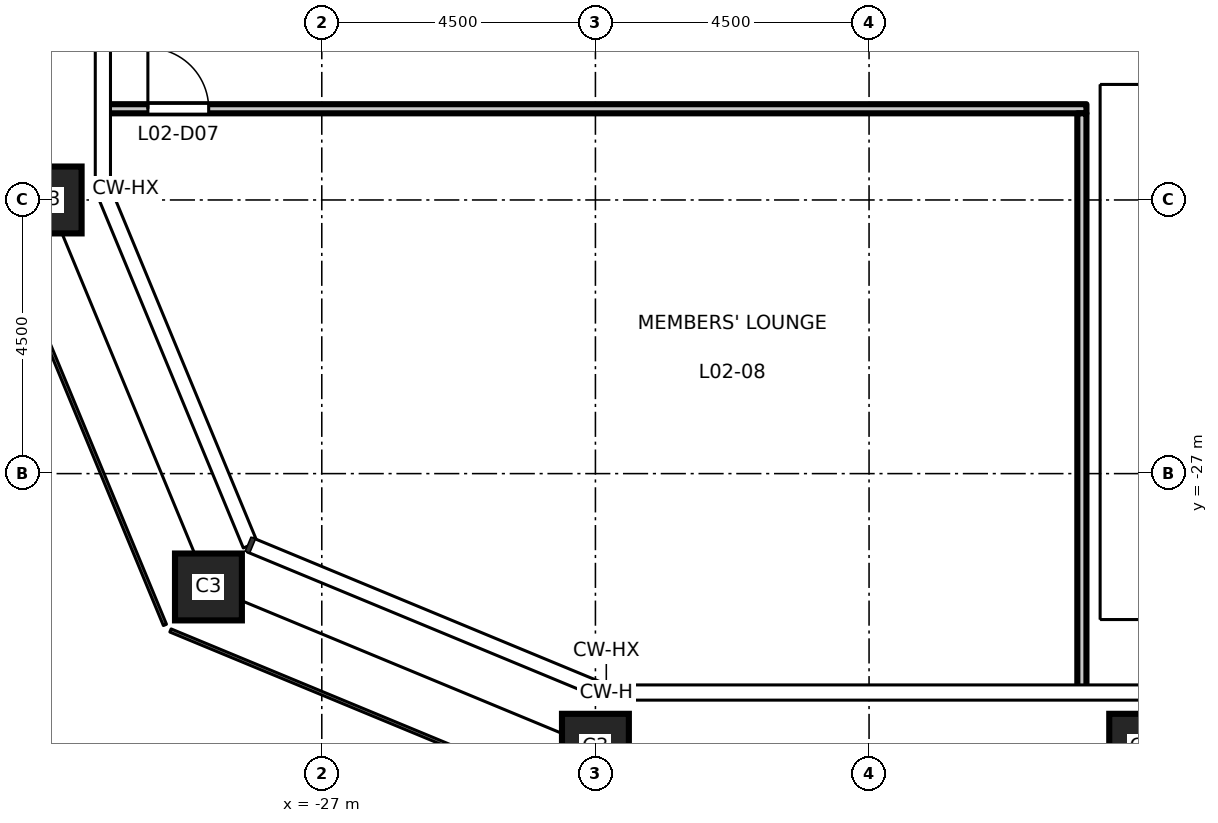
"""IFC4 building model, lengths in metres.
Left out: names, types, materials, properties, quantities, classifications, styles, units other than length and angle.
Written with IfcOpenShell. Run it as: python <this file> out.ifc"""

import sys

from ifc_helpers import new_model, si_unit, direction, frame, frame_2d, origin, origin_2d, place, context, subcontext, project, spatial, rectangle, hollow_rectangle, extrude, element, fill, save


model = new_model("IFC4")
c1 = context("Model", 3, precision=1e-05, world=origin(), true_north=direction((0.0, 1.0)))
c2 = subcontext(c1, "Body", "Model", "MODEL_VIEW")
j1 = project(units=[si_unit("LENGTHUNIT", "METRE"), si_unit("PLANEANGLEUNIT", "RADIAN")], contexts=[c1])
p1 = place(None, origin())
s1 = spatial("IfcSite", under=j1, at=p1, CompositionType="ELEMENT")
p2 = place(p1, origin())
s2 = spatial("IfcBuilding", under=s1, at=p2, CompositionType="ELEMENT")
p3 = place(p2, frame((0.0, 0.0, 12.2)))
s3 = spatial("IfcBuildingStorey", under=s2, at=p3, CompositionType="ELEMENT", Elevation=12.2)
for number, where, z_axis, x_axis in (
    (1, (-22.5, -31.5, 0.0), (0.0, 0.0, 1.0), (1.0, 0.0, 0.0)),
    (2, (-13.5, -31.5, 0.0), (0.0, 0.0, 1.0), (1.0, 0.0, 0.0)),
    (3, (-31.5, -22.5, 0.0), (0.0, 0.0, 1.0), (1.0, 0.0, 0.0)),
    (4, (-28.864, -28.864, 0.0), (0.0, 0.0, 1.0), (1.0, 0.0, 0.0)),
):
    element("IfcColumn", number, at=place(p3, frame(where, z_axis=z_axis, x_axis=x_axis)), inside=s3, PredefinedType="COLUMN", context=c2, shape_type="SweptSolid", body=[
        extrude(hollow_rectangle(XDim=1.1, YDim=1.1, WallThickness=0.07, at=origin_2d()), origin(), (0.0, 0.0, 1.0), 5.0),
    ])
p4 = place(p3, frame((-30.51, -21.0, 0.0), z_axis=(0.0, 0.0, 1.0), x_axis=(1.0, 0.0, 0.0)))
e5 = element("IfcWall", 5, at=p4, inside=s3, PredefinedType="PARTITIONING", context=c2, shape_type="SweptSolid", body=[
    extrude(rectangle(XDim=16.085, YDim=0.15, at=frame_2d((8.042, 0.0))), origin(), (0.0, 0.0, 1.0), 4.85),
])
p5 = place(p4, frame((0.65, 0.0, 0.0)))
e6 = element("IfcOpeningElement", 6, at=p5, cuts=e5, PredefinedType="OPENING", context=c2, shape_type="SweptSolid", body=[
    extrude(rectangle(XDim=1.0, YDim=2.1, at=frame_2d((0.5, 1.05))), frame((0.0, 0.085, 0.0), z_axis=(0.0, -1.0, 0.0), x_axis=(1.0, 0.0, 0.0)), (0.0, 0.0, 1.0), 0.17),
])
p6 = place(p3, frame((-14.5, -30.51, 0.0), z_axis=(0.0, 0.0, 1.0), x_axis=(0.0, 1.0, 0.0)))
e7 = element("IfcWall", 7, at=p6, inside=s3, PredefinedType="PARTITIONING", context=c2, shape_type="SweptSolid", body=[
    extrude(rectangle(XDim=9.435, YDim=0.15, at=frame_2d((4.718, 0.0))), origin(), (0.0, 0.0, 1.0), 4.85),
])
p7 = place(p5, origin())
e8 = element("IfcDoor", 8, at=p7, inside=s3, OperationType="SINGLE_SWING_LEFT", PredefinedType="DOOR", context=c2, shape_type="SweptSolid", body=[
    extrude(rectangle(XDim=1.0, YDim=2.1, at=frame_2d((0.5, 1.05))), frame((0.0, 0.025, 0.0), z_axis=(0.0, -1.0, 0.0), x_axis=(1.0, 0.0, 0.0)), (0.0, 0.0, 1.0), 0.05),
])
fill(e6, e8)
save(model, sys.argv[1])
